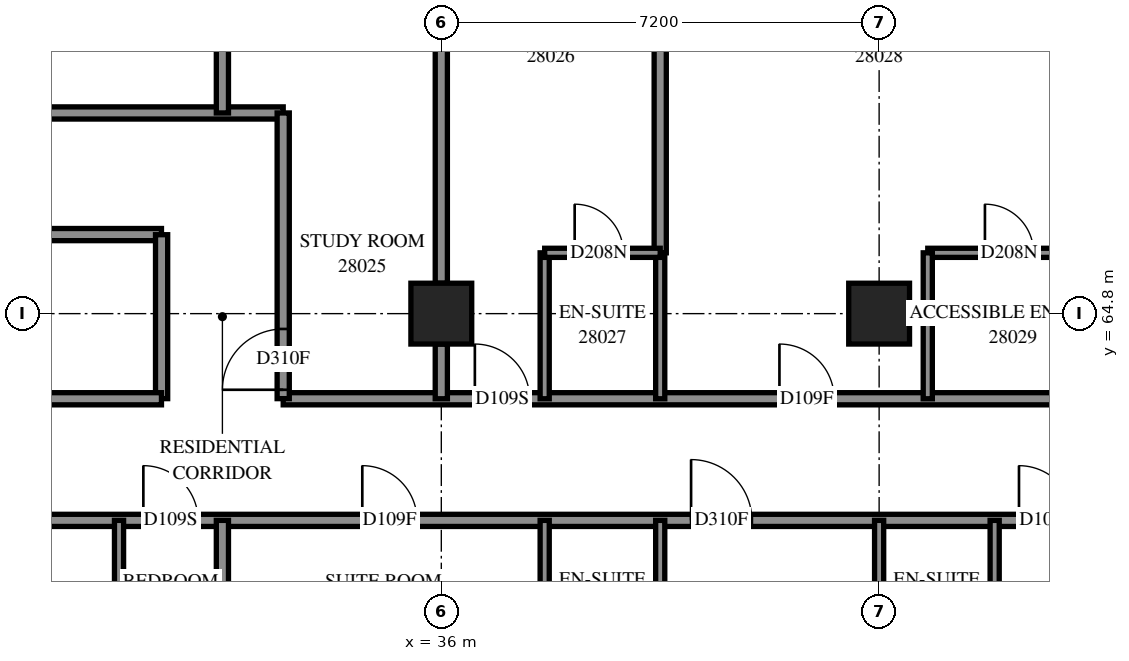
"""IFC4 building model, lengths in metres.
Left out: names, types, materials, properties, quantities, classifications, styles, units other than length and angle.
Written with IfcOpenShell. Run it as: python <this file> out.ifc"""

import sys

from ifc_helpers import new_model, si_unit, direction, frame, frame_2d, origin, origin_2d, place, context, subcontext, project, spatial, rectangle, extrude, element, fill, save


model = new_model("IFC4")
c1 = context("Model", 3, precision=1e-05, world=origin(), true_north=direction((0.0, 1.0)))
c2 = subcontext(c1, "Body", "Model", "MODEL_VIEW")
j1 = project(units=[si_unit("LENGTHUNIT", "METRE"), si_unit("PLANEANGLEUNIT", "RADIAN")], contexts=[c1])
p1 = place(None, origin())
s1 = spatial("IfcSite", under=j1, at=p1, CompositionType="ELEMENT")
p2 = place(p1, origin())
s2 = spatial("IfcBuilding", under=s1, at=p2, CompositionType="ELEMENT")
p3 = place(p2, frame((0.0, 0.0, 105.0)))
s3 = spatial("IfcBuildingStorey", under=s2, at=p3, CompositionType="ELEMENT", Elevation=105.0)
for number, where, z_axis, x_axis in (
    (1, (36.0, 64.8, 0.0), (0.0, 0.0, 1.0), (1.0, 0.0, 0.0)),
    (2, (43.2, 64.8, 0.0), (0.0, 0.0, 1.0), (1.0, 0.0, 0.0)),
):
    element("IfcColumn", number, at=place(p3, frame(where, z_axis=z_axis, x_axis=x_axis)), inside=s3, PredefinedType="COLUMN", context=c2, shape_type="SweptSolid", body=[
        extrude(rectangle(XDim=1.0, YDim=1.0, at=origin_2d()), origin(), (0.0, 0.0, 1.0), 3.1),
    ])
p4 = place(p3, frame((28.8, 61.4, 0.0), z_axis=(0.0, 0.0, 1.0), x_axis=(1.0, 0.0, 0.0)))
e3 = element("IfcWall", 3, at=p4, inside=s3, PredefinedType="PARTITIONING", context=c2, shape_type="SweptSolid", body=[
    extrude(rectangle(XDim=24.2, YDim=0.2, at=frame_2d((12.1, 0.0))), origin(), (0.0, 0.0, 1.0), 3.1),
])
p5 = place(p4, frame((2.3, 0.0, 0.0)))
e4 = element("IfcOpeningElement", 4, at=p5, cuts=e3, PredefinedType="OPENING", context=c2, shape_type="SweptSolid", body=[
    extrude(rectangle(XDim=0.9, YDim=2.1, at=frame_2d((0.45, 1.05))), frame((0.0, 0.11, 0.0), z_axis=(0.0, -1.0, 0.0), x_axis=(1.0, 0.0, 0.0)), (0.0, 0.0, 1.0), 0.22),
])
p6 = place(p4, frame((5.901, 0.0, 0.0)))
e5 = element("IfcOpeningElement", 5, at=p6, cuts=e3, PredefinedType="OPENING", context=c2, shape_type="SweptSolid", body=[
    extrude(rectangle(XDim=0.9, YDim=2.1, at=frame_2d((0.45, 1.05))), frame((0.0, 0.11, 0.0), z_axis=(0.0, -1.0, 0.0), x_axis=(1.0, 0.0, 0.0)), (0.0, 0.0, 1.0), 0.22),
])
p7 = place(p4, frame((11.307, 0.0, 0.0)))
e6 = element("IfcOpeningElement", 6, at=p7, cuts=e3, PredefinedType="OPENING", context=c2, shape_type="SweptSolid", body=[
    extrude(rectangle(XDim=1.0, YDim=2.1, at=frame_2d((0.5, 1.05))), frame((0.0, 0.11, 0.0), z_axis=(0.0, -1.0, 0.0), x_axis=(1.0, 0.0, 0.0)), (0.0, 0.0, 1.0), 0.22),
])
p8 = place(p4, frame((16.7, 0.0, 0.0)))
e7 = element("IfcOpeningElement", 7, at=p8, cuts=e3, PredefinedType="OPENING", context=c2, shape_type="SweptSolid", body=[
    extrude(rectangle(XDim=0.9, YDim=2.1, at=frame_2d((0.45, 1.05))), frame((0.0, 0.11, 0.0), z_axis=(0.0, -1.0, 0.0), x_axis=(1.0, 0.0, 0.0)), (0.0, 0.0, 1.0), 0.22),
])
p9 = place(p4, frame((18.508, 0.0, 0.0)))
e8 = element("IfcOpeningElement", 8, at=p9, cuts=e3, PredefinedType="OPENING", context=c2, shape_type="SweptSolid", body=[
    extrude(rectangle(XDim=1.0, YDim=2.1, at=frame_2d((0.5, 1.05))), frame((0.0, 0.11, 0.0), z_axis=(0.0, -1.0, 0.0), x_axis=(1.0, 0.0, 0.0)), (0.0, 0.0, 1.0), 0.22),
])
p10 = place(p4, frame((23.074, 0.0, 0.0)))
e9 = element("IfcOpeningElement", 9, at=p10, cuts=e3, PredefinedType="OPENING", context=c2, shape_type="SweptSolid", body=[
    extrude(rectangle(XDim=1.0, YDim=2.1, at=frame_2d((0.5, 1.05))), frame((0.0, 0.11, 0.0), z_axis=(0.0, -1.0, 0.0), x_axis=(1.0, 0.0, 0.0)), (0.0, 0.0, 1.0), 0.22),
])
p11 = place(p3, frame((33.4, 63.4, 0.0), z_axis=(0.0, 0.0, 1.0), x_axis=(1.0, 0.0, 0.0)))
e10 = element("IfcWall", 10, at=p11, inside=s3, PredefinedType="PARTITIONING", context=c2, shape_type="SweptSolid", body=[
    extrude(rectangle(XDim=21.9, YDim=0.2, at=frame_2d((10.95, 0.0))), origin(), (0.0, 0.0, 1.0), 3.1),
])
p12 = place(p11, frame((3.152, 0.0, 0.0)))
e11 = element("IfcOpeningElement", 11, at=p12, cuts=e10, PredefinedType="OPENING", context=c2, shape_type="SweptSolid", body=[
    extrude(rectangle(XDim=0.9, YDim=2.1, at=frame_2d((0.45, 1.05))), frame((0.0, 0.11, 0.0), z_axis=(0.0, -1.0, 0.0), x_axis=(1.0, 0.0, 0.0)), (0.0, 0.0, 1.0), 0.22),
])
p13 = place(p11, frame((8.161, 0.0, 0.0)))
e12 = element("IfcOpeningElement", 12, at=p13, cuts=e10, PredefinedType="OPENING", context=c2, shape_type="SweptSolid", body=[
    extrude(rectangle(XDim=0.9, YDim=2.1, at=frame_2d((0.45, 1.05))), frame((0.0, 0.11, 0.0), z_axis=(0.0, -1.0, 0.0), x_axis=(1.0, 0.0, 0.0)), (0.0, 0.0, 1.0), 0.22),
])
p14 = place(p11, frame((15.471, 0.0, 0.0)))
e13 = element("IfcOpeningElement", 13, at=p14, cuts=e10, PredefinedType="OPENING", context=c2, shape_type="SweptSolid", body=[
    extrude(rectangle(XDim=1.0, YDim=2.1, at=frame_2d((0.5, 1.05))), frame((0.0, 0.11, 0.0), z_axis=(0.0, -1.0, 0.0), x_axis=(1.0, 0.0, 0.0)), (0.0, 0.0, 1.0), 0.22),
])
p15 = place(p3, frame((21.602, 68.1, 0.0), z_axis=(0.0, 0.0, 1.0), x_axis=(1.0, 0.0, 0.0)))
e14 = element("IfcWall", 14, at=p15, inside=s3, PredefinedType="PARTITIONING", context=c2, shape_type="SweptSolid", body=[
    extrude(rectangle(XDim=11.798, YDim=0.2, at=frame_2d((5.899, 0.0))), origin(), (0.0, 0.0, 1.0), 3.1),
])
p16 = place(p15, frame((5.972, 0.0, 0.0)))
e15 = element("IfcOpeningElement", 15, at=p16, cuts=e14, PredefinedType="OPENING", context=c2, shape_type="SweptSolid", body=[
    extrude(rectangle(XDim=1.0, YDim=2.1, at=frame_2d((0.5, 1.05))), frame((0.0, 0.11, 0.0), z_axis=(0.0, -1.0, 0.0), x_axis=(1.0, 0.0, 0.0)), (0.0, 0.0, 1.0), 0.22),
])
p17 = place(p3, frame((21.602, 66.1, 0.0), z_axis=(0.0, 0.0, 1.0), x_axis=(1.0, 0.0, 0.0)))
e16 = element("IfcWall", 16, at=p17, inside=s3, PredefinedType="PARTITIONING", context=c2, shape_type="SweptSolid", body=[
    extrude(rectangle(XDim=9.796, YDim=0.2, at=frame_2d((4.898, 0.0))), origin(), (0.0, 0.0, 1.0), 3.1),
])
p18 = place(p17, frame((1.805, 0.0, 0.0)))
e17 = element("IfcOpeningElement", 17, at=p18, cuts=e16, PredefinedType="OPENING", context=c2, shape_type="SweptSolid", body=[
    extrude(rectangle(XDim=1.0, YDim=2.1, at=frame_2d((0.5, 1.05))), frame((0.0, 0.11, 0.0), z_axis=(0.0, -1.0, 0.0), x_axis=(1.0, 0.0, 0.0)), (0.0, 0.0, 1.0), 0.22),
])
p19 = place(p17, frame((5.459, 0.0, 0.0)))
e18 = element("IfcOpeningElement", 18, at=p19, cuts=e16, PredefinedType="OPENING", context=c2, shape_type="SweptSolid", body=[
    extrude(rectangle(XDim=1.0, YDim=2.1, at=frame_2d((0.5, 1.05))), frame((0.0, 0.11, 0.0), z_axis=(0.0, -1.0, 0.0), x_axis=(1.0, 0.0, 0.0)), (0.0, 0.0, 1.0), 0.22),
])
p20 = place(p3, frame((39.6, 65.8, 0.0), z_axis=(0.0, 0.0, 1.0), x_axis=(0.0, 1.0, 0.0)))
e19 = element("IfcWall", 19, at=p20, inside=s3, PredefinedType="PARTITIONING", context=c2, shape_type="SweptSolid", body=[
    extrude(rectangle(XDim=7.019, YDim=0.2, at=frame_2d((3.509, 0.0))), origin(), (0.0, 0.0, 1.0), 3.1),
])
p21 = place(p3, frame((36.0, 65.3, 0.0), z_axis=(0.0, 0.0, 1.0), x_axis=(0.0, 1.0, 0.0)))
e20 = element("IfcWall", 20, at=p21, inside=s3, PredefinedType="PARTITIONING", context=c2, shape_type="SweptSolid", body=[
    extrude(rectangle(XDim=6.2, YDim=0.2, at=frame_2d((3.1, 0.0))), origin(), (0.0, 0.0, 1.0), 3.1),
])
p22 = place(p3, frame((32.4, 55.838, 0.0), z_axis=(0.0, 0.0, 1.0), x_axis=(0.0, 1.0, 0.0)))
e21 = element("IfcWall", 21, at=p22, inside=s3, PredefinedType="PARTITIONING", context=c2, shape_type="SweptSolid", body=[
    extrude(rectangle(XDim=5.562, YDim=0.2, at=frame_2d((2.781, 0.0))), origin(), (0.0, 0.0, 1.0), 3.1),
])
p23 = place(p3, frame((32.4, 68.1, 0.0), z_axis=(0.0, 0.0, 1.0), x_axis=(0.0, 1.0, 0.0)))
e22 = element("IfcWall", 22, at=p23, inside=s3, PredefinedType="PARTITIONING", context=c2, shape_type="SweptSolid", body=[
    extrude(rectangle(XDim=4.774, YDim=0.2, at=frame_2d((2.387, 0.0))), origin(), (0.0, 0.0, 1.0), 3.1),
])
p24 = place(p3, frame((33.4, 63.402, 0.0), z_axis=(0.0, 0.0, 1.0), x_axis=(0.0, 1.0, 0.0)))
e23 = element("IfcWall", 23, at=p24, inside=s3, PredefinedType="PARTITIONING", context=c2, shape_type="SweptSolid", body=[
    extrude(rectangle(XDim=4.698, YDim=0.2, at=frame_2d((2.349, 0.0))), origin(), (0.0, 0.0, 1.0), 3.1),
])
p25 = place(p24, frame((0.146, 0.0, 0.0)))
e24 = element("IfcOpeningElement", 24, at=p25, cuts=e23, PredefinedType="OPENING", context=c2, shape_type="SweptSolid", body=[
    extrude(rectangle(XDim=1.0, YDim=2.1, at=frame_2d((0.5, 1.05))), frame((0.0, 0.11, 0.0), z_axis=(0.0, -1.0, 0.0), x_axis=(1.0, 0.0, 0.0)), (0.0, 0.0, 1.0), 0.22),
])
p26 = place(p3, frame((44.0, 65.8, 0.0), z_axis=(0.0, 0.0, 1.0), x_axis=(1.0, 0.0, 0.0)))
e25 = element("IfcWall", 25, at=p26, inside=s3, PredefinedType="PARTITIONING", context=c2, shape_type="SweptSolid", body=[
    extrude(rectangle(XDim=2.8, YDim=0.15, at=frame_2d((1.4, 0.0))), origin(), (0.0, 0.0, 1.0), 3.1),
])
p27 = place(p26, frame((0.94, 0.0, 0.0)))
e26 = element("IfcOpeningElement", 26, at=p27, cuts=e25, PredefinedType="OPENING", context=c2, shape_type="SweptSolid", body=[
    extrude(rectangle(XDim=0.8, YDim=2.1, at=frame_2d((0.4, 1.05))), frame((0.0, 0.085, 0.0), z_axis=(0.0, -1.0, 0.0), x_axis=(1.0, 0.0, 0.0)), (0.0, 0.0, 1.0), 0.17),
])
p28 = place(p3, frame((31.4, 63.402, 0.0), z_axis=(0.0, 0.0, 1.0), x_axis=(0.0, 1.0, 0.0)))
e27 = element("IfcWall", 27, at=p28, inside=s3, PredefinedType="PARTITIONING", context=c2, shape_type="SweptSolid", body=[
    extrude(rectangle(XDim=2.696, YDim=0.2, at=frame_2d((1.348, 0.0))), origin(), (0.0, 0.0, 1.0), 3.1),
])
p29 = place(p3, frame((28.802, 63.4, 0.0), z_axis=(0.0, 0.0, 1.0), x_axis=(1.0, 0.0, 0.0)))
e28 = element("IfcWall", 28, at=p29, inside=s3, PredefinedType="PARTITIONING", context=c2, shape_type="SweptSolid", body=[
    extrude(rectangle(XDim=2.596, YDim=0.2, at=frame_2d((1.298, 0.0))), origin(), (0.0, 0.0, 1.0), 3.1),
])
for number, where, z_axis, x_axis in (
    (29, (30.7, 59.0, 0.0), (0.0, 0.0, 1.0), (0.0, 1.0, 0.0)),
    (30, (37.7, 59.0, 0.0), (0.0, 0.0, 1.0), (0.0, 1.0, 0.0)),
    (31, (37.7, 63.4, 0.0), (0.0, 0.0, 1.0), (0.0, 1.0, 0.0)),
    (32, (39.6, 59.0, 0.0), (0.0, 0.0, 1.0), (0.0, 1.0, 0.0)),
    (33, (39.6, 63.4, 0.0), (0.0, 0.0, 1.0), (0.0, 1.0, 0.0)),
    (34, (45.1, 59.0, 0.0), (0.0, 0.0, 1.0), (0.0, 1.0, 0.0)),
    (35, (43.2, 59.0, 0.0), (0.0, 0.0, 1.0), (0.0, 1.0, 0.0)),
    (36, (44.0, 63.4, 0.0), (0.0, 0.0, 1.0), (0.0, 1.0, 0.0)),
):
    element("IfcWall", number, at=place(p3, frame(where, z_axis=z_axis, x_axis=x_axis)), inside=s3, PredefinedType="PARTITIONING", context=c2, shape_type="SweptSolid", body=[
        extrude(rectangle(XDim=2.4, YDim=0.15, at=frame_2d((1.2, 0.0))), origin(), (0.0, 0.0, 1.0), 3.1),
    ])
p30 = place(p3, frame((37.7, 65.8, 0.0), z_axis=(0.0, 0.0, 1.0), x_axis=(1.0, 0.0, 0.0)))
e37 = element("IfcWall", 37, at=p30, inside=s3, PredefinedType="PARTITIONING", context=c2, shape_type="SweptSolid", body=[
    extrude(rectangle(XDim=1.9, YDim=0.15, at=frame_2d((0.95, 0.0))), origin(), (0.0, 0.0, 1.0), 3.1),
])
p31 = place(p30, frame((0.493, 0.0, 0.0)))
e38 = element("IfcOpeningElement", 38, at=p31, cuts=e37, PredefinedType="OPENING", context=c2, shape_type="SweptSolid", body=[
    extrude(rectangle(XDim=0.8, YDim=2.1, at=frame_2d((0.4, 1.05))), frame((0.0, 0.085, 0.0), z_axis=(0.0, -1.0, 0.0), x_axis=(1.0, 0.0, 0.0)), (0.0, 0.0, 1.0), 0.17),
])
p32 = place(p3, frame((36.0, 63.4, 0.0), z_axis=(0.0, 0.0, 1.0), x_axis=(0.0, 1.0, 0.0)))
e39 = element("IfcWall", 39, at=p32, inside=s3, PredefinedType="PARTITIONING", context=c2, shape_type="SweptSolid", body=[
    extrude(rectangle(XDim=0.9, YDim=0.2, at=frame_2d((0.45, 0.0))), origin(), (0.0, 0.0, 1.0), 3.1),
])
p33 = place(p5, origin())
e40 = element("IfcDoor", 40, at=p33, inside=s3, OperationType="SINGLE_SWING_LEFT", PredefinedType="DOOR", context=c2, shape_type="SweptSolid", body=[
    extrude(rectangle(XDim=0.9, YDim=2.1, at=frame_2d((0.45, 1.05))), frame((0.0, 0.025, 0.0), z_axis=(0.0, -1.0, 0.0), x_axis=(1.0, 0.0, 0.0)), (0.0, 0.0, 1.0), 0.05),
])
fill(e4, e40)
p34 = place(p6, origin())
e41 = element("IfcDoor", 41, at=p34, inside=s3, OperationType="SINGLE_SWING_RIGHT", PredefinedType="DOOR", context=c2, shape_type="SweptSolid", body=[
    extrude(rectangle(XDim=0.9, YDim=2.1, at=frame_2d((0.45, 1.05))), frame((0.0, 0.025, 0.0), z_axis=(0.0, -1.0, 0.0), x_axis=(1.0, 0.0, 0.0)), (0.0, 0.0, 1.0), 0.05),
])
fill(e5, e41)
p35 = place(p25, origin())
e42 = element("IfcDoor", 42, at=p35, inside=s3, OperationType="SINGLE_SWING_LEFT", PredefinedType="DOOR", context=c2, shape_type="SweptSolid", body=[
    extrude(rectangle(XDim=1.0, YDim=2.1, at=frame_2d((0.5, 1.05))), frame((0.0, 0.025, 0.0), z_axis=(0.0, -1.0, 0.0), x_axis=(1.0, 0.0, 0.0)), (0.0, 0.0, 1.0), 0.05),
])
fill(e24, e42)
p36 = place(p12, origin())
e43 = element("IfcDoor", 43, at=p36, inside=s3, OperationType="SINGLE_SWING_RIGHT", PredefinedType="DOOR", context=c2, shape_type="SweptSolid", body=[
    extrude(rectangle(XDim=0.9, YDim=2.1, at=frame_2d((0.45, 1.05))), frame((0.0, 0.025, 0.0), z_axis=(0.0, -1.0, 0.0), x_axis=(1.0, 0.0, 0.0)), (0.0, 0.0, 1.0), 0.05),
])
fill(e11, e43)
p37 = place(p31, origin())
e44 = element("IfcDoor", 44, at=p37, inside=s3, OperationType="SINGLE_SWING_RIGHT", PredefinedType="DOOR", context=c2, shape_type="SweptSolid", body=[
    extrude(rectangle(XDim=0.8, YDim=2.1, at=frame_2d((0.4, 1.05))), frame((0.0, 0.025, 0.0), z_axis=(0.0, -1.0, 0.0), x_axis=(1.0, 0.0, 0.0)), (0.0, 0.0, 1.0), 0.05),
])
fill(e38, e44)
p38 = place(p13, origin())
e45 = element("IfcDoor", 45, at=p38, inside=s3, OperationType="SINGLE_SWING_LEFT", PredefinedType="DOOR", context=c2, shape_type="SweptSolid", body=[
    extrude(rectangle(XDim=0.9, YDim=2.1, at=frame_2d((0.45, 1.05))), frame((0.0, 0.025, 0.0), z_axis=(0.0, -1.0, 0.0), x_axis=(1.0, 0.0, 0.0)), (0.0, 0.0, 1.0), 0.05),
])
fill(e12, e45)
p39 = place(p27, origin())
e46 = element("IfcDoor", 46, at=p39, inside=s3, OperationType="SINGLE_SWING_RIGHT", PredefinedType="DOOR", context=c2, shape_type="SweptSolid", body=[
    extrude(rectangle(XDim=0.8, YDim=2.1, at=frame_2d((0.4, 1.05))), frame((0.0, 0.025, 0.0), z_axis=(0.0, -1.0, 0.0), x_axis=(1.0, 0.0, 0.0)), (0.0, 0.0, 1.0), 0.05),
])
fill(e26, e46)
p40 = place(p7, origin())
e47 = element("IfcDoor", 47, at=p40, inside=s3, OperationType="SINGLE_SWING_RIGHT", PredefinedType="DOOR", context=c2, shape_type="SweptSolid", body=[
    extrude(rectangle(XDim=1.0, YDim=2.1, at=frame_2d((0.5, 1.05))), frame((0.0, 0.025, 0.0), z_axis=(0.0, -1.0, 0.0), x_axis=(1.0, 0.0, 0.0)), (0.0, 0.0, 1.0), 0.05),
])
fill(e6, e47)
p41 = place(p8, origin())
e48 = element("IfcDoor", 48, at=p41, inside=s3, OperationType="SINGLE_SWING_LEFT", PredefinedType="DOOR", context=c2, shape_type="SweptSolid", body=[
    extrude(rectangle(XDim=0.9, YDim=2.1, at=frame_2d((0.45, 1.05))), frame((0.0, 0.025, 0.0), z_axis=(0.0, -1.0, 0.0), x_axis=(1.0, 0.0, 0.0)), (0.0, 0.0, 1.0), 0.05),
])
fill(e7, e48)
save(model, sys.argv[1])
